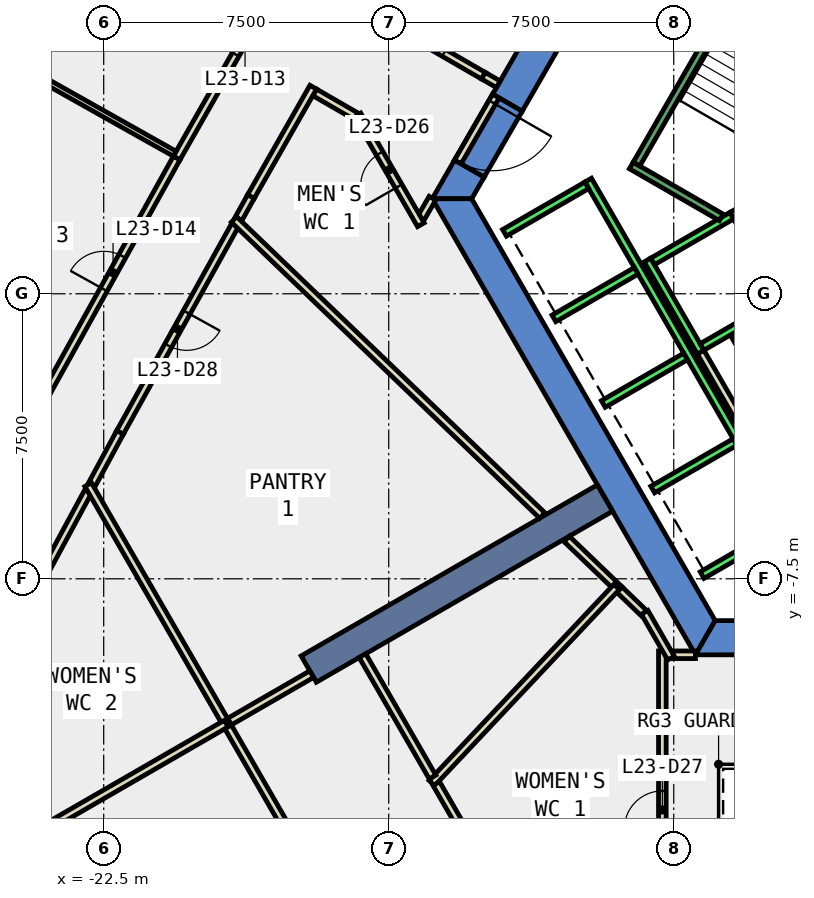
"""IFC4 building model, lengths in metres.
Left out: names, types, materials, properties, quantities, classifications, styles, units other than length and angle.
Written with IfcOpenShell. Run it as: python <this file> out.ifc"""

import sys

from ifc_helpers import new_model, si_unit, direction, frame, frame_2d, origin, place, context, subcontext, project, spatial, polyline, rectangle, outline, extrude, element, fill, save


model = new_model("IFC4")
c1 = context("Model", 3, precision=1e-05, world=origin(), true_north=direction((0.0, 1.0)))
c2 = subcontext(c1, "Body", "Model", "MODEL_VIEW")
j1 = project(units=[si_unit("LENGTHUNIT", "METRE"), si_unit("PLANEANGLEUNIT", "RADIAN")], contexts=[c1])
p1 = place(None, origin())
s1 = spatial("IfcSite", under=j1, at=p1, CompositionType="ELEMENT")
p2 = place(p1, origin())
s2 = spatial("IfcBuilding", under=s1, at=p2, CompositionType="ELEMENT")
p3 = place(p2, frame((0.0, 0.0, 107.6)))
s3 = spatial("IfcBuildingStorey", under=s2, at=p3, CompositionType="ELEMENT", Elevation=107.6)
p4 = place(p3, frame((0.0, 0.0, -0.4)))
e1 = element("IfcWall", 1, at=p4, inside=s3, PredefinedType="SHEAR", context=c2, shape_type="SweptSolid", body=[
    extrude(outline(polyline([(-12.267, 5.252), (-11.488, 4.802), (-6.409, 13.6), (-6.928, 14.5), (-12.267, 5.252)])), origin(), (0.0, 0.0, 1.0), 4.2),
])
p5 = place(p3, frame((0.0, 0.0, -0.4)))
e2 = element("IfcWall", 2, at=p5, inside=s3, PredefinedType="SHEAR", context=c2, shape_type="SweptSolid", body=[
    extrude(outline(polyline([(-12.488, 3.07), (-13.267, 3.52), (-13.856, 2.5), (-12.817, 2.5), (-12.488, 3.07)])), origin(), (0.0, 0.0, 1.0), 4.2),
])
p6 = place(p3, frame((0.0, 0.0, 3.6)))
e3 = element("IfcWall", 3, at=p6, inside=s3, PredefinedType="SHEAR", context=c2, shape_type="SweptSolid", body=[
    extrude(outline(polyline([(-13.267, 3.52), (-12.488, 3.07), (-11.488, 4.802), (-12.267, 5.252), (-13.267, 3.52)])), origin(), (0.0, 0.0, 1.0), 0.2),
])
p7 = place(p3, frame((0.0, 0.0, -0.4)))
e4 = element("IfcWall", 4, at=p7, inside=s3, PredefinedType="SHEAR", context=c2, shape_type="SweptSolid", body=[
    extrude(outline(polyline([(-13.856, 2.5), (-6.928, -9.5), (-6.409, -8.6), (-12.817, 2.5), (-13.856, 2.5)])), origin(), (0.0, 0.0, 1.0), 4.2),
])
p8 = place(p3, frame((0.0, 0.0, -0.4)))
e5 = element("IfcWall", 5, at=p8, inside=s3, PredefinedType="SHEAR", context=c2, shape_type="SweptSolid", body=[
    extrude(outline(polyline([(3.75, -9.5), (3.75, -8.6), (-6.409, -8.6), (-6.928, -9.5), (3.75, -9.5)])), origin(), (0.0, 0.0, 1.0), 4.2),
])
p9 = place(p3, frame((-9.31, -5.375, -0.4), z_axis=(0.0, 0.0, 1.0), x_axis=(-0.866017533419, -0.500013631625, 0.0)))
e6 = element("IfcWall", 6, at=p9, inside=s3, PredefinedType="SHEAR", context=c2, shape_type="SweptSolid", body=[
    extrude(rectangle(XDim=9.0, YDim=0.8, at=frame_2d((4.5, 0.0))), origin(), (0.0, 0.0, 1.0), 4.2),
])
p10 = place(p3, frame((-15.835, 7.658, 0.0), z_axis=(0.0, 0.0, 1.0), x_axis=(0.866076614194, -0.499911290476, 0.0)))
e7 = element("IfcWall", 7, at=p10, inside=s3, PredefinedType="PARTITIONING", context=c2, shape_type="SweptSolid", body=[
    extrude(rectangle(XDim=3.843, YDim=0.2, at=frame_2d((1.921, 0.0))), origin(), (0.0, 0.0, 1.0), 3.8),
])
p11 = place(p10, frame((1.646, 0.0, 0.0)))
e8 = element("IfcOpeningElement", 8, at=p11, cuts=e7, PredefinedType="OPENING", context=c2, shape_type="SweptSolid", body=[
    extrude(rectangle(XDim=1.0, YDim=2.1, at=frame_2d((0.5, 1.05))), frame((0.0, 0.11, 0.0), z_axis=(0.0, -1.0, 0.0), x_axis=(1.0, 0.0, 0.0)), (0.0, 0.0, 1.0), 0.22),
])
p12 = place(p3, frame((-13.85, 2.514, 0.0), z_axis=(0.0, 0.0, 1.0), x_axis=(-0.500418219013, -0.865783810244, 0.0)))
e9 = element("IfcWall", 9, at=p12, inside=s3, PredefinedType="PARTITIONING", context=c2, shape_type="SweptSolid", body=[
    extrude(rectangle(XDim=0.607, YDim=0.2, at=frame_2d((0.304, 0.0))), origin(), (0.0, 0.0, 1.0), 3.8),
])
p13 = place(p3, frame((-14.154, 1.815, 0.0), z_axis=(0.0, 0.0, 1.0), x_axis=(-0.500038857296, 0.866002968352, 0.0)))
e10 = element("IfcWall", 10, at=p13, inside=s3, PredefinedType="PARTITIONING", context=c2, shape_type="SweptSolid", body=[
    extrude(rectangle(XDim=3.34, YDim=0.2, at=frame_2d((1.67, 0.0))), origin(), (0.0, 0.0, 1.0), 3.8),
])
p14 = place(p13, frame((1.17, 0.0, 0.0)))
e11 = element("IfcOpeningElement", 11, at=p14, cuts=e10, PredefinedType="OPENING", context=c2, shape_type="SweptSolid", body=[
    extrude(rectangle(XDim=1.0, YDim=2.1, at=frame_2d((0.5, 1.05))), frame((0.0, 0.11, 0.0), z_axis=(0.0, -1.0, 0.0), x_axis=(1.0, 0.0, 0.0)), (0.0, 0.0, 1.0), 0.22),
])
p15 = place(p3, frame((-15.86, 4.671, 0.0), z_axis=(0.0, 0.0, 1.0), x_axis=(-0.866192052573, 0.49971124468, 0.0)))
e12 = element("IfcWall", 12, at=p15, inside=s3, PredefinedType="PARTITIONING", context=c2, shape_type="SweptSolid", body=[
    extrude(rectangle(XDim=1.257, YDim=0.2, at=frame_2d((0.628, 0.0))), origin(), (0.0, 0.0, 1.0), 3.8),
])
p16 = place(p3, frame((-16.986, 5.436, 0.0), z_axis=(0.0, 0.0, 1.0), x_axis=(-0.49514688151, -0.868809280412, 0.0)))
e13 = element("IfcWall", 13, at=p16, inside=s3, PredefinedType="PARTITIONING", context=c2, shape_type="SweptSolid", body=[
    extrude(rectangle(XDim=3.314, YDim=0.2, at=frame_2d((1.657, 0.0))), origin(), (0.0, 0.0, 1.0), 3.8),
])
p17 = place(p3, frame((-18.627, 2.557, 0.0), z_axis=(0.0, 0.0, 1.0), x_axis=(-0.484771582084, -0.874640790956, 0.0)))
e14 = element("IfcWall", 14, at=p17, inside=s3, PredefinedType="PARTITIONING", context=c2, shape_type="SweptSolid", body=[
    extrude(rectangle(XDim=0.666, YDim=0.2, at=frame_2d((0.333, 0.0))), origin(), (0.0, 0.0, 1.0), 3.8),
])
p18 = place(p3, frame((-19.047, 1.799, 0.0), z_axis=(0.0, 0.0, 1.0), x_axis=(-0.485240396382, -0.87438078531, 0.0)))
e15 = element("IfcWall", 15, at=p18, inside=s3, PredefinedType="PARTITIONING", context=c2, shape_type="SweptSolid", body=[
    extrude(rectangle(XDim=6.232, YDim=0.2, at=frame_2d((3.116, 0.0))), origin(), (0.0, 0.0, 1.0), 3.8),
])
p19 = place(p18, frame((2.616, 0.0, 0.0)))
e16 = element("IfcOpeningElement", 16, at=p19, cuts=e15, PredefinedType="OPENING", context=c2, shape_type="SweptSolid", body=[
    extrude(rectangle(XDim=1.0, YDim=2.1, at=frame_2d((0.5, 1.05))), frame((0.0, 0.11, 0.0), z_axis=(0.0, -1.0, 0.0), x_axis=(1.0, 0.0, 0.0)), (0.0, 0.0, 1.0), 0.22),
])
p20 = place(p3, frame((-22.071, -3.65, 0.0), z_axis=(0.0, 0.0, 1.0), x_axis=(-0.475212034938, -0.879871309823, 0.0)))
e17 = element("IfcWall", 17, at=p20, inside=s3, PredefinedType="PARTITIONING", context=c2, shape_type="SweptSolid", body=[
    extrude(rectangle(XDim=1.557, YDim=0.2, at=frame_2d((0.779, 0.0))), origin(), (0.0, 0.0, 1.0), 3.8),
])
p21 = place(p3, frame((-22.906, -5.196, 0.0), z_axis=(0.0, 0.0, 1.0), x_axis=(-0.475448213767, -0.879743710421, 0.0)))
e18 = element("IfcWall", 18, at=p21, inside=s3, PredefinedType="PARTITIONING", context=c2, shape_type="SweptSolid", body=[
    extrude(rectangle(XDim=5.343, YDim=0.2, at=frame_2d((2.671, 0.0))), origin(), (0.0, 0.0, 1.0), 3.8),
])
p22 = place(p3, frame((-20.581, 3.571, 0.0), z_axis=(0.0, 0.0, 1.0), x_axis=(0.495138372197, 0.868814129937, 0.0)))
e19 = element("IfcWall", 19, at=p22, inside=s3, PredefinedType="PARTITIONING", context=c2, shape_type="SweptSolid", body=[
    extrude(rectangle(XDim=7.124, YDim=0.2, at=frame_2d((3.562, 0.0))), origin(), (0.0, 0.0, 1.0), 3.8),
])
p23 = place(p22, frame((3.137, 0.0, 0.0)))
e20 = element("IfcOpeningElement", 20, at=p23, cuts=e19, PredefinedType="OPENING", context=c2, shape_type="SweptSolid", body=[
    extrude(rectangle(XDim=1.0, YDim=2.1, at=frame_2d((0.5, 1.05))), frame((0.0, 0.11, 0.0), z_axis=(0.0, -1.0, 0.0), x_axis=(1.0, 0.0, 0.0)), (0.0, 0.0, 1.0), 0.22),
])
p24 = place(p3, frame((-24.0, -2.593, 0.0), z_axis=(0.0, 0.0, 1.0), x_axis=(0.485148833338, 0.874431592242, 0.0)))
e21 = element("IfcWall", 21, at=p24, inside=s3, PredefinedType="PARTITIONING", context=c2, shape_type="SweptSolid", body=[
    extrude(rectangle(XDim=7.049, YDim=0.2, at=frame_2d((3.525, 0.0))), origin(), (0.0, 0.0, 1.0), 3.8),
])
p25 = place(p24, frame((3.099, 0.0, 0.0)))
e22 = element("IfcOpeningElement", 22, at=p25, cuts=e21, PredefinedType="OPENING", context=c2, shape_type="SweptSolid", body=[
    extrude(rectangle(XDim=1.0, YDim=2.1, at=frame_2d((0.5, 1.05))), frame((0.0, 0.11, 0.0), z_axis=(0.0, -1.0, 0.0), x_axis=(1.0, 0.0, 0.0)), (0.0, 0.0, 1.0), 0.22),
])
p26 = place(p3, frame((-5.126, -2.422, 0.0), z_axis=(0.0, 0.0, 1.0), x_axis=(-0.500062241894, 0.865989465428, 0.0)))
e23 = element("IfcWall", 23, at=p26, inside=s3, PredefinedType="PARTITIONING", context=c2, shape_type="SweptSolid", body=[
    extrude(rectangle(XDim=1.7, YDim=0.2, at=frame_2d((0.85, 0.0))), origin(), (0.0, 0.0, 1.0), 3.8),
])
p27 = place(p3, frame((-5.492, -3.788, 0.0), z_axis=(0.0, 0.0, 1.0), x_axis=(-0.500008949224, 0.866020236886, 0.0)))
e24 = element("IfcWall", 24, at=p27, inside=s3, PredefinedType="PARTITIONING", context=c2, shape_type="SweptSolid", body=[
    extrude(rectangle(XDim=2.68, YDim=0.2, at=frame_2d((1.34, 0.0))), origin(), (0.0, 0.0, 1.0), 3.8),
])
p28 = place(p3, frame((-7.522, -9.499, 0.0), z_axis=(0.0, 0.0, 1.0), x_axis=(1.0, 0.0, 0.0)))
e25 = element("IfcWall", 25, at=p28, inside=s3, PredefinedType="PARTITIONING", context=c2, shape_type="SweptSolid", body=[
    extrude(rectangle(XDim=0.593, YDim=0.2, at=frame_2d((0.296, 0.0))), origin(), (0.0, 0.0, 1.0), 3.8),
])
p29 = place(p3, frame((-7.8, -17.765, 0.0), z_axis=(0.0, 0.0, 1.0), x_axis=(0.0, 1.0, 0.0)))
e26 = element("IfcWall", 26, at=p29, inside=s3, PredefinedType="PARTITIONING", context=c2, shape_type="SweptSolid", body=[
    extrude(rectangle(XDim=8.366, YDim=0.2, at=frame_2d((4.183, 0.0))), origin(), (0.0, 0.0, 1.0), 3.8),
])
p30 = place(p29, frame((3.683, 0.0, 0.0)))
e27 = element("IfcOpeningElement", 27, at=p30, cuts=e26, PredefinedType="OPENING", context=c2, shape_type="SweptSolid", body=[
    extrude(rectangle(XDim=1.0, YDim=2.1, at=frame_2d((0.5, 1.05))), frame((0.0, 0.11, 0.0), z_axis=(0.0, -1.0, 0.0), x_axis=(1.0, 0.0, 0.0)), (0.0, 0.0, 1.0), 0.22),
])
p31 = place(p3, frame((-8.93, -7.783, 0.0), z_axis=(0.0, 0.0, 1.0), x_axis=(0.720954255291, -0.692982656189, 0.0)))
e28 = element("IfcWall", 28, at=p31, inside=s3, PredefinedType="PARTITIONING", context=c2, shape_type="SweptSolid", body=[
    extrude(rectangle(XDim=0.89, YDim=0.2, at=frame_2d((0.445, 0.0))), origin(), (0.0, 0.0, 1.0), 3.8),
])
p32 = place(p3, frame((-7.572, -9.586, 0.0), z_axis=(0.0, 0.0, 1.0), x_axis=(-0.499484152563, 0.866323023669, 0.0)))
e29 = element("IfcWall", 29, at=p32, inside=s3, PredefinedType="PARTITIONING", context=c2, shape_type="SweptSolid", body=[
    extrude(rectangle(XDim=1.39, YDim=0.2, at=frame_2d((0.695, 0.0))), origin(), (0.0, 0.0, 1.0), 3.8),
])
p33 = place(p3, frame((-8.93, -7.783, 0.0), z_axis=(0.0, 0.0, 1.0), x_axis=(-0.72124523191, 0.692679807305, 0.0)))
e30 = element("IfcWall", 30, at=p33, inside=s3, PredefinedType="PARTITIONING", context=c2, shape_type="SweptSolid", body=[
    extrude(rectangle(XDim=1.923, YDim=0.2, at=frame_2d((0.961, 0.0))), origin(), (0.0, 0.0, 1.0), 3.8),
])
p34 = place(p3, frame((-13.865, -12.876, 0.0), z_axis=(0.0, 0.0, 1.0), x_axis=(0.685651384846, 0.727930064263, 0.0)))
e31 = element("IfcWall", 31, at=p34, inside=s3, PredefinedType="PARTITIONING", context=c2, shape_type="SweptSolid", body=[
    extrude(rectangle(XDim=7.091, YDim=0.2, at=frame_2d((3.545, 0.0))), origin(), (0.0, 0.0, 1.0), 3.8),
])
p35 = place(p3, frame((-10.973, -17.695, 0.0), z_axis=(0.0, 0.0, 1.0), x_axis=(-0.499986535608, 0.866033177315, 0.0)))
e32 = element("IfcWall", 32, at=p35, inside=s3, PredefinedType="PARTITIONING", context=c2, shape_type="SweptSolid", body=[
    extrude(rectangle(XDim=5.549, YDim=0.2, at=frame_2d((2.774, 0.0))), origin(), (0.0, 0.0, 1.0), 3.8),
])
p36 = place(p3, frame((-13.847, -12.716, 0.0), z_axis=(0.0, 0.0, 1.0), x_axis=(-0.499861859587, 0.866105144501, 0.0)))
e33 = element("IfcWall", 33, at=p36, inside=s3, PredefinedType="PARTITIONING", context=c2, shape_type="SweptSolid", body=[
    extrude(rectangle(XDim=3.689, YDim=0.2, at=frame_2d((1.844, 0.0))), origin(), (0.0, 0.0, 1.0), 3.8),
])
p37 = place(p3, frame((-17.027, -10.009, 0.0), z_axis=(0.0, 0.0, 1.0), x_axis=(-0.865950948929, -0.500128937424, 0.0)))
e34 = element("IfcWall", 34, at=p37, inside=s3, PredefinedType="PARTITIONING", context=c2, shape_type="SweptSolid", body=[
    extrude(rectangle(XDim=2.599, YDim=0.2, at=frame_2d((1.3, 0.0))), origin(), (0.0, 0.0, 1.0), 3.8),
])
p38 = place(p3, frame((-19.278, -11.309, 0.0), z_axis=(0.0, 0.0, 1.0), x_axis=(-0.500044545065, 0.865999684151, 0.0)))
e35 = element("IfcWall", 35, at=p38, inside=s3, PredefinedType="PARTITIONING", context=c2, shape_type="SweptSolid", body=[
    extrude(rectangle(XDim=7.261, YDim=0.2, at=frame_2d((3.63, 0.0))), origin(), (0.0, 0.0, 1.0), 3.8),
])
p39 = place(p3, frame((-15.646, -17.6, 0.0), z_axis=(0.0, 0.0, 1.0), x_axis=(-0.499953299825, 0.866052364464, 0.0)))
e36 = element("IfcWall", 36, at=p39, inside=s3, PredefinedType="PARTITIONING", context=c2, shape_type="SweptSolid", body=[
    extrude(rectangle(XDim=7.263, YDim=0.2, at=frame_2d((3.631, 0.0))), origin(), (0.0, 0.0, 1.0), 3.8),
])
p40 = place(p3, frame((-19.277, -11.311, 0.0), z_axis=(0.0, 0.0, 1.0), x_axis=(-0.866078939042, -0.499907262747, 0.0)))
e37 = element("IfcWall", 37, at=p40, inside=s3, PredefinedType="PARTITIONING", context=c2, shape_type="SweptSolid", body=[
    extrude(rectangle(XDim=10.864, YDim=0.2, at=frame_2d((5.432, 0.0))), origin(), (0.0, 0.0, 1.0), 3.8),
])
p41 = place(p3, frame((-20.631, 3.685, 0.0), z_axis=(0.0, 0.0, 1.0), x_axis=(-0.871680720442, 0.490074200106, 0.0)))
e38 = element("IfcWall", 38, at=p41, inside=s3, PredefinedType="PARTITIONING", context=c2, shape_type="SweptSolid", body=[
    extrude(rectangle(XDim=5.33, YDim=0.15, at=frame_2d((2.665, 0.0))), origin(), (0.0, 0.0, 1.0), 3.8),
])
p42 = place(p3, frame((-12.18, 5.202, 0.0), z_axis=(0.0, 0.0, 1.0), x_axis=(-0.50002537861, -0.866010750942, 0.0)))
e39 = element("IfcWall", 39, at=p42, inside=s3, PredefinedType="PARTITIONING", context=c2, shape_type="SweptSolid", body=[
    extrude(rectangle(XDim=2.0, YDim=0.2, at=frame_2d((1.0, 0.0))), origin(), (0.0, 0.0, 1.0), 2.4),
])
p43 = place(p42, frame((0.19, 0.0, 0.0)))
e40 = element("IfcOpeningElement", 40, at=p43, cuts=e39, PredefinedType="OPENING", context=c2, shape_type="SweptSolid", body=[
    extrude(rectangle(XDim=1.8, YDim=2.1, at=frame_2d((0.9, 1.05))), frame((0.0, 0.11, 0.0), z_axis=(0.0, -1.0, 0.0), x_axis=(1.0, 0.0, 0.0)), (0.0, 0.0, 1.0), 0.22),
])
p44 = place(p3, frame((-10.96, -5.834, 0.0), z_axis=(0.0, 0.0, 1.0), x_axis=(-0.721236335428, 0.692689070549, 0.0)))
e41 = element("IfcWall", 41, at=p44, inside=s3, PredefinedType="PARTITIONING", context=c2, shape_type="SweptSolid", body=[
    extrude(rectangle(XDim=11.246, YDim=0.2, at=frame_2d((5.623, 0.0))), origin(), (0.0, 0.0, 1.0), 3.8),
])
p45 = place(p3, frame((-12.507, 5.737, 0.0), z_axis=(0.0, 0.0, 1.0), x_axis=(0.866167537795, -0.499753735824, 0.0)))
e42 = element("IfcWall", 42, at=p45, inside=s3, PredefinedType="PARTITIONING", context=c2, shape_type="SweptSolid", body=[
    extrude(rectangle(XDim=0.45, YDim=0.2, at=frame_2d((0.225, 0.0))), origin(), (0.0, 0.0, 1.0), 2.4),
])
p46 = place(p3, frame((-5.94, 2.188, 0.0), z_axis=(0.0, 0.0, 1.0), x_axis=(0.49994636267, -0.866056369097, 0.0)))
e43 = element("IfcWall", 43, at=p46, inside=s3, PredefinedType="STANDARD", context=c2, shape_type="SweptSolid", body=[
    extrude(rectangle(XDim=2.8, YDim=0.2, at=frame_2d((1.4, 0.0))), origin(), (0.0, 0.0, 1.0), 3.8),
])
p47 = place(p46, frame((1.225, 0.0, 0.0)))
e44 = element("IfcOpeningElement", 44, at=p47, cuts=e43, PredefinedType="OPENING", context=c2, shape_type="SweptSolid", body=[
    extrude(rectangle(XDim=1.1, YDim=2.1, at=frame_2d((0.55, 1.05))), frame((0.0, 0.11, 0.0), z_axis=(0.0, -1.0, 0.0), x_axis=(1.0, 0.0, 0.0)), (0.0, 0.0, 1.0), 0.22),
])
p48 = place(p3, frame((-8.192, 0.888, 0.0), z_axis=(0.0, 0.0, 1.0), x_axis=(0.49994636267, -0.866056369097, 0.0)))
e45 = element("IfcWall", 45, at=p48, inside=s3, PredefinedType="STANDARD", context=c2, shape_type="SweptSolid", body=[
    extrude(rectangle(XDim=2.8, YDim=0.2, at=frame_2d((1.4, 0.0))), origin(), (0.0, 0.0, 1.0), 3.8),
])
for number, where, z_axis, x_axis in (
    (46, (-5.977, 2.052, 0.0), (0.0, 0.0, 1.0), (-0.866, -0.5, 0.0)),
    (47, (-4.677, -0.2, 0.0), (0.0, 0.0, 1.0), (-0.866, -0.5, 0.0)),
):
    element("IfcWall", number, at=place(p3, frame(where, z_axis=z_axis, x_axis=x_axis)), inside=s3, PredefinedType="STANDARD", context=c2, shape_type="SweptSolid", body=[
        extrude(rectangle(XDim=2.399, YDim=0.2, at=frame_2d((1.2, 0.0))), origin(), (0.0, 0.0, 1.0), 3.8),
    ])
p49 = place(p3, frame((-9.751, 2.99, 0.0), z_axis=(0.0, 0.0, 1.0), x_axis=(0.50000090737, -0.866024879913, 0.0)))
e48 = element("IfcWall", 48, at=p49, inside=s3, PredefinedType="STANDARD", context=c2, shape_type="SweptSolid", body=[
    extrude(rectangle(XDim=10.6, YDim=0.2, at=frame_2d((5.3, 0.0))), origin(), (0.0, 0.0, 1.0), 3.8),
])
p50 = place(p3, frame((-9.788, 2.853, 0.0), z_axis=(0.0, 0.0, 1.0), x_axis=(-0.865998541277, -0.500046524342, 0.0)))
e49 = element("IfcWall", 49, at=p50, inside=s3, PredefinedType="STANDARD", context=c2, shape_type="SweptSolid", body=[
    extrude(rectangle(XDim=2.5, YDim=0.2, at=frame_2d((1.25, 0.0))), origin(), (0.0, 0.0, 1.0), 3.8),
])
for number, where, z_axis, x_axis in (
    (50, (-8.488, 0.602, 0.0), (0.0, 0.0, 1.0), (-0.866, -0.5, 0.0)),
    (51, (-7.188, -1.65, 0.0), (0.0, 0.0, 1.0), (-0.866, -0.5, 0.0)),
    (52, (-5.888, -3.902, 0.0), (0.0, 0.0, 1.0), (-0.866, -0.5, 0.0)),
    (53, (-4.588, -6.153, 0.0), (0.0, 0.0, 1.0), (-0.866, -0.5, 0.0)),
):
    element("IfcWall", number, at=place(p3, frame(where, z_axis=z_axis, x_axis=x_axis)), inside=s3, PredefinedType="STANDARD", context=c2, shape_type="SweptSolid", body=[
        extrude(rectangle(XDim=2.5, YDim=0.2, at=frame_2d((1.25, 0.0))), origin(), (0.0, 0.0, 1.0), 3.8),
    ])
p51 = place(p3, frame((-6.25, 2.01, 0.0), z_axis=(0.0, 0.0, 1.0), x_axis=(-0.86611865017, 0.499838457731, 0.0)))
e54 = element("IfcWall", 54, at=p51, inside=s3, PredefinedType="STANDARD", context=c2, shape_type="SweptSolid", body=[
    extrude(rectangle(XDim=2.733, YDim=0.2, at=frame_2d((1.366, 0.0))), origin(), (0.0, 0.0, 1.0), 3.8),
])
p52 = place(p3, frame((-5.03, 9.388, 0.0), z_axis=(0.0, 0.0, 1.0), x_axis=(-0.499978703459, -0.866037698999, 0.0)))
e55 = element("IfcWall", 55, at=p52, inside=s3, PredefinedType="STANDARD", context=c2, shape_type="SweptSolid", body=[
    extrude(rectangle(XDim=6.9, YDim=0.2, at=frame_2d((3.45, 0.0))), origin(), (0.0, 0.0, 1.0), 3.8),
])
p53 = place(p23, origin())
e56 = element("IfcDoor", 56, at=p53, inside=s3, OperationType="SINGLE_SWING_LEFT", PredefinedType="DOOR", context=c2, shape_type="SweptSolid", body=[
    extrude(rectangle(XDim=1.0, YDim=2.1, at=frame_2d((0.5, 1.05))), frame((0.0, 0.025, 0.0), z_axis=(0.0, -1.0, 0.0), x_axis=(1.0, 0.0, 0.0)), (0.0, 0.0, 1.0), 0.05),
])
fill(e20, e56)
p54 = place(p25, origin())
e57 = element("IfcDoor", 57, at=p54, inside=s3, OperationType="SINGLE_SWING_LEFT", PredefinedType="DOOR", context=c2, shape_type="SweptSolid", body=[
    extrude(rectangle(XDim=1.0, YDim=2.1, at=frame_2d((0.5, 1.05))), frame((0.0, 0.025, 0.0), z_axis=(0.0, -1.0, 0.0), x_axis=(1.0, 0.0, 0.0)), (0.0, 0.0, 1.0), 0.05),
])
fill(e22, e57)
p55 = place(p14, origin())
e58 = element("IfcDoor", 58, at=p55, inside=s3, OperationType="SINGLE_SWING_LEFT", PredefinedType="DOOR", context=c2, shape_type="SweptSolid", body=[
    extrude(rectangle(XDim=1.0, YDim=2.1, at=frame_2d((0.5, 1.05))), frame((0.0, 0.025, 0.0), z_axis=(0.0, -1.0, 0.0), x_axis=(1.0, 0.0, 0.0)), (0.0, 0.0, 1.0), 0.05),
])
fill(e11, e58)
p56 = place(p30, origin())
e59 = element("IfcDoor", 59, at=p56, inside=s3, OperationType="SINGLE_SWING_RIGHT", PredefinedType="DOOR", context=c2, shape_type="SweptSolid", body=[
    extrude(rectangle(XDim=1.0, YDim=2.1, at=frame_2d((0.5, 1.05))), frame((0.0, 0.025, 0.0), z_axis=(0.0, -1.0, 0.0), x_axis=(1.0, 0.0, 0.0)), (0.0, 0.0, 1.0), 0.05),
])
fill(e27, e59)
p57 = place(p19, origin())
e60 = element("IfcDoor", 60, at=p57, inside=s3, OperationType="SINGLE_SWING_LEFT", PredefinedType="DOOR", context=c2, shape_type="SweptSolid", body=[
    extrude(rectangle(XDim=1.0, YDim=2.1, at=frame_2d((0.5, 1.05))), frame((0.0, 0.025, 0.0), z_axis=(0.0, -1.0, 0.0), x_axis=(1.0, 0.0, 0.0)), (0.0, 0.0, 1.0), 0.05),
])
fill(e16, e60)
p58 = place(p11, origin())
e61 = element("IfcDoor", 61, at=p58, inside=s3, OperationType="SINGLE_SWING_LEFT", PredefinedType="DOOR", context=c2, shape_type="SweptSolid", body=[
    extrude(rectangle(XDim=1.0, YDim=2.1, at=frame_2d((0.5, 1.05))), frame((0.0, 0.025, 0.0), z_axis=(0.0, -1.0, 0.0), x_axis=(1.0, 0.0, 0.0)), (0.0, 0.0, 1.0), 0.05),
])
fill(e8, e61)
p59 = place(p43, origin())
e62 = element("IfcDoor", 62, at=p59, inside=s3, OperationType="DOUBLE_DOOR_SINGLE_SWING", PredefinedType="DOOR", context=c2, shape_type="SweptSolid", body=[
    extrude(rectangle(XDim=1.8, YDim=2.1, at=frame_2d((0.9, 1.05))), frame((0.0, 0.025, 0.0), z_axis=(0.0, -1.0, 0.0), x_axis=(1.0, 0.0, 0.0)), (0.0, 0.0, 1.0), 0.05),
])
fill(e40, e62)
save(model, sys.argv[1])
